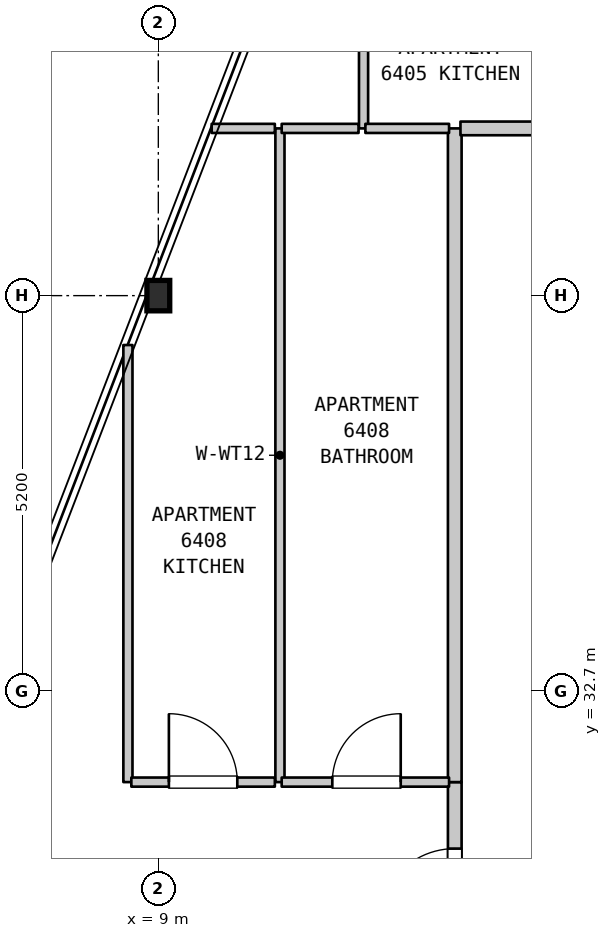
"""IFC4 building model, lengths in metres.
Left out: names, types, materials, properties, quantities, classifications, styles, units other than length and angle.
Written with IfcOpenShell. Run it as: python <this file> out.ifc"""

import sys

from ifc_helpers import new_model, si_unit, direction, frame, frame_2d, origin, origin_2d, place, context, subcontext, project, spatial, rectangle, i_section, extrude, element, fill, save


model = new_model("IFC4")
c1 = context("Model", 3, precision=1e-05, world=origin(), true_north=direction((0.0, 1.0)))
c2 = subcontext(c1, "Body", "Model", "MODEL_VIEW")
j1 = project(units=[si_unit("LENGTHUNIT", "METRE"), si_unit("PLANEANGLEUNIT", "RADIAN")], contexts=[c1])
p1 = place(None, origin())
s1 = spatial("IfcSite", under=j1, at=p1, CompositionType="ELEMENT")
p2 = place(p1, origin())
s2 = spatial("IfcBuilding", under=s1, at=p2, CompositionType="ELEMENT")
p3 = place(p2, frame((0.0, 0.0, 258.4)))
s3 = spatial("IfcBuildingStorey", under=s2, at=p3, CompositionType="ELEMENT", Elevation=258.4)
p4 = place(p3, frame((9.0, 37.9, 0.0), z_axis=(0.0, 0.0, 1.0), x_axis=(1.0, 0.0, 0.0)))
e1 = element("IfcColumn", 1, at=p4, inside=s3, PredefinedType="COLUMN", context=c2, shape_type="SweptSolid", body=[
    extrude(i_section(OverallWidth=0.3, OverallDepth=0.4, WebThickness=0.013, FlangeThickness=0.024, FilletRadius=0.027, at=origin_2d()), origin(), (0.0, 0.0, 1.0), 3.7),
])
p5 = place(p3, frame((8.6, 31.5, 0.0), z_axis=(0.0, 0.0, 1.0), x_axis=(0.0, 1.0, 0.0)))
e2 = element("IfcWall", 2, at=p5, inside=s3, PredefinedType="PARTITIONING", context=c2, shape_type="SweptSolid", body=[
    extrude(rectangle(XDim=5.75, YDim=0.12, at=frame_2d((2.875, 0.0))), origin(), (0.0, 0.0, 1.0), 3.39),
])
p6 = place(p3, frame((10.6, 31.5, 0.0), z_axis=(0.0, 0.0, 1.0), x_axis=(0.0, 1.0, 0.0)))
e3 = element("IfcWall", 3, at=p6, inside=s3, PredefinedType="PARTITIONING", context=c2, shape_type="SweptSolid", body=[
    extrude(rectangle(XDim=8.6, YDim=0.12, at=frame_2d((4.3, 0.0))), origin(), (0.0, 0.0, 1.0), 3.39),
])
p7 = place(p3, frame((11.7, 40.1, 0.0), z_axis=(0.0, 0.0, 1.0), x_axis=(0.0, 1.0, 0.0)))
e4 = element("IfcWall", 4, at=p7, inside=s3, PredefinedType="PARTITIONING", context=c2, shape_type="SweptSolid", body=[
    extrude(rectangle(XDim=2.3, YDim=0.12, at=frame_2d((1.15, 0.0))), origin(), (0.0, 0.0, 1.0), 3.39),
])
p8 = place(p3, frame((12.9, 28.75, 0.0), z_axis=(0.0, 0.0, 1.0), x_axis=(0.0, 1.0, 0.0)))
e5 = element("IfcWall", 5, at=p8, inside=s3, PredefinedType="STANDARD", context=c2, shape_type="SweptSolid", body=[
    extrude(rectangle(XDim=2.75, YDim=0.18, at=frame_2d((1.375, 0.0))), origin(), (0.0, 0.0, 1.0), 3.39),
])
p9 = place(p8, frame((0.875, 0.0, 0.0)))
e6 = element("IfcOpeningElement", 6, at=p9, cuts=e5, PredefinedType="OPENING", context=c2, shape_type="SweptSolid", body=[
    extrude(rectangle(XDim=1.0, YDim=2.15, at=frame_2d((0.5, 1.075))), frame((0.0, 0.1, 0.0), z_axis=(0.0, -1.0, 0.0), x_axis=(1.0, 0.0, 0.0)), (0.0, 0.0, 1.0), 0.2),
])
p10 = place(p3, frame((12.9, 31.5, 0.0), z_axis=(0.0, 0.0, 1.0), x_axis=(0.0, 1.0, 0.0)))
e7 = element("IfcWall", 7, at=p10, inside=s3, PredefinedType="STANDARD", context=c2, shape_type="SweptSolid", body=[
    extrude(rectangle(XDim=8.6, YDim=0.18, at=frame_2d((4.3, 0.0))), origin(), (0.0, 0.0, 1.0), 3.39),
])
p11 = place(p3, frame((8.645, 31.5, 0.0), z_axis=(0.0, 0.0, 1.0), x_axis=(1.0, 0.0, 0.0)))
e8 = element("IfcWall", 8, at=p11, inside=s3, PredefinedType="PARTITIONING", context=c2, shape_type="SweptSolid", body=[
    extrude(rectangle(XDim=1.888, YDim=0.12, at=frame_2d((0.944, 0.0))), origin(), (0.0, 0.0, 1.0), 3.39),
])
p12 = place(p11, frame((0.494, 0.0, 0.0)))
e9 = element("IfcOpeningElement", 9, at=p12, cuts=e8, PredefinedType="OPENING", context=c2, shape_type="SweptSolid", body=[
    extrude(rectangle(XDim=0.9, YDim=2.15, at=frame_2d((0.45, 1.075))), frame((0.0, 0.07, 0.0), z_axis=(0.0, -1.0, 0.0), x_axis=(1.0, 0.0, 0.0)), (0.0, 0.0, 1.0), 0.14),
])
p13 = place(p3, frame((10.623, 31.5, 0.0), z_axis=(0.0, 0.0, 1.0), x_axis=(1.0, 0.0, 0.0)))
e10 = element("IfcWall", 10, at=p13, inside=s3, PredefinedType="PARTITIONING", context=c2, shape_type="SweptSolid", body=[
    extrude(rectangle(XDim=2.202, YDim=0.12, at=frame_2d((1.101, 0.0))), origin(), (0.0, 0.0, 1.0), 3.39),
])
p14 = place(p13, frame((0.666, 0.0, 0.0)))
e11 = element("IfcOpeningElement", 11, at=p14, cuts=e10, PredefinedType="OPENING", context=c2, shape_type="SweptSolid", body=[
    extrude(rectangle(XDim=0.9, YDim=2.1, at=frame_2d((0.45, 1.05))), frame((0.0, 0.07, 0.0), z_axis=(0.0, -1.0, 0.0), x_axis=(1.0, 0.0, 0.0)), (0.0, 0.0, 1.0), 0.14),
])
p15 = place(p3, frame((9.702, 40.1, 0.0), z_axis=(0.0, 0.0, 1.0), x_axis=(1.0, 0.0, 0.0)))
e12 = element("IfcWall", 12, at=p15, inside=s3, PredefinedType="PARTITIONING", context=c2, shape_type="SweptSolid", body=[
    extrude(rectangle(XDim=0.831, YDim=0.12, at=frame_2d((0.416, 0.0))), origin(), (0.0, 0.0, 1.0), 3.39),
])
p16 = place(p3, frame((10.623, 40.1, 0.0), z_axis=(0.0, 0.0, 1.0), x_axis=(1.0, 0.0, 0.0)))
e13 = element("IfcWall", 13, at=p16, inside=s3, PredefinedType="PARTITIONING", context=c2, shape_type="SweptSolid", body=[
    extrude(rectangle(XDim=1.011, YDim=0.12, at=frame_2d((0.505, 0.0))), origin(), (0.0, 0.0, 1.0), 3.39),
])
p17 = place(p3, frame((11.724, 40.1, 0.0), z_axis=(0.0, 0.0, 1.0), x_axis=(1.0, 0.0, 0.0)))
e14 = element("IfcWall", 14, at=p17, inside=s3, PredefinedType="PARTITIONING", context=c2, shape_type="SweptSolid", body=[
    extrude(rectangle(XDim=1.101, YDim=0.12, at=frame_2d((0.55, 0.0))), origin(), (0.0, 0.0, 1.0), 3.39),
])
p18 = place(p3, frame((12.975, 40.1, 0.0), z_axis=(0.0, 0.0, 1.0), x_axis=(1.0, 0.0, 0.0)))
e15 = element("IfcWall", 15, at=p18, inside=s3, PredefinedType="STANDARD", context=c2, shape_type="SweptSolid", body=[
    extrude(rectangle(XDim=2.025, YDim=0.18, at=frame_2d((1.012, 0.0))), origin(), (0.0, 0.0, 1.0), 3.39),
])
p19 = place(p9, origin())
e16 = element("IfcDoor", 16, at=p19, inside=s3, OperationType="SINGLE_SWING_LEFT", PredefinedType="DOOR", context=c2, shape_type="SweptSolid", body=[
    extrude(rectangle(XDim=1.0, YDim=2.15, at=frame_2d((0.5, 1.075))), frame((0.0, 0.025, 0.0), z_axis=(0.0, -1.0, 0.0), x_axis=(1.0, 0.0, 0.0)), (0.0, 0.0, 1.0), 0.05),
])
fill(e6, e16)
p20 = place(p12, origin())
e17 = element("IfcDoor", 17, at=p20, inside=s3, OperationType="SINGLE_SWING_LEFT", PredefinedType="DOOR", context=c2, shape_type="SweptSolid", body=[
    extrude(rectangle(XDim=0.9, YDim=2.15, at=frame_2d((0.45, 1.075))), frame((0.0, 0.025, 0.0), z_axis=(0.0, -1.0, 0.0), x_axis=(1.0, 0.0, 0.0)), (0.0, 0.0, 1.0), 0.05),
])
fill(e9, e17)
p21 = place(p14, origin())
e18 = element("IfcDoor", 18, at=p21, inside=s3, OperationType="SINGLE_SWING_RIGHT", PredefinedType="DOOR", context=c2, shape_type="SweptSolid", body=[
    extrude(rectangle(XDim=0.9, YDim=2.1, at=frame_2d((0.45, 1.05))), frame((0.0, 0.025, 0.0), z_axis=(0.0, -1.0, 0.0), x_axis=(1.0, 0.0, 0.0)), (0.0, 0.0, 1.0), 0.05),
])
fill(e11, e18)
save(model, sys.argv[1])
